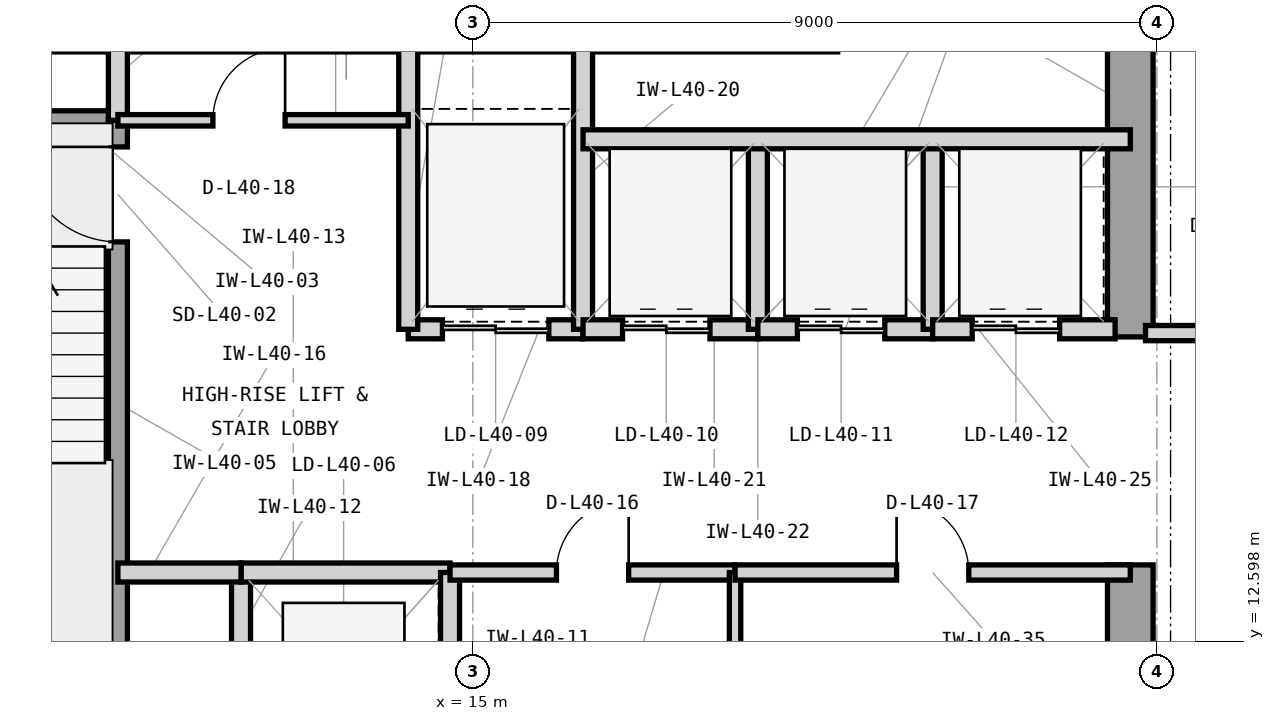
"""IFC4 building model, lengths in metres.
Left out: names, types, materials, properties, quantities, classifications, styles, units other than length and angle.
Written with IfcOpenShell. Run it as: python <this file> out.ifc"""

import sys

from ifc_helpers import new_model, si_unit, direction, frame, frame_2d, origin, place, context, subcontext, project, spatial, rectangle, extrude, element, fill, save


model = new_model("IFC4")
c1 = context("Model", 3, precision=1e-05, world=origin(), true_north=direction((0.0, 1.0)))
c2 = subcontext(c1, "Body", "Model", "MODEL_VIEW")
j1 = project(units=[si_unit("LENGTHUNIT", "METRE"), si_unit("PLANEANGLEUNIT", "RADIAN")], contexts=[c1])
p1 = place(None, origin())
s1 = spatial("IfcSite", under=j1, at=p1, CompositionType="ELEMENT")
p2 = place(p1, origin())
s2 = spatial("IfcBuilding", under=s1, at=p2, CompositionType="ELEMENT")
p3 = place(p2, frame((0.0, 0.0, 168.3)))
s3 = spatial("IfcBuildingStorey", under=s2, at=p3, CompositionType="ELEMENT", Elevation=168.3)
p4 = place(p3, frame((7.475, 20.65, 0.0), z_axis=(0.0, 0.0, 1.0), x_axis=(1.0, 0.0, 0.0)))
e1 = element("IfcWall", 1, at=p4, inside=s3, PredefinedType="SHEAR", context=c2, shape_type="SweptSolid", body=[
    extrude(rectangle(XDim=12.325, YDim=0.6, at=frame_2d((6.163, 0.0))), origin(), (0.0, 0.0, 1.0), 3.9),
])
p5 = place(p3, frame((23.65, 10.4, 0.0), z_axis=(0.0, 0.0, 1.0), x_axis=(0.0, 1.0, 0.0)))
e2 = element("IfcWall", 2, at=p5, inside=s3, PredefinedType="SHEAR", context=c2, shape_type="SweptSolid", body=[
    extrude(rectangle(XDim=3.2, YDim=0.6, at=frame_2d((1.6, 0.0))), origin(), (0.0, 0.0, 1.0), 3.9),
])
p6 = place(p3, frame((23.65, 16.6, 0.0), z_axis=(0.0, 0.0, 1.0), x_axis=(0.0, 1.0, 0.0)))
e3 = element("IfcWall", 3, at=p6, inside=s3, PredefinedType="SHEAR", context=c2, shape_type="SweptSolid", body=[
    extrude(rectangle(XDim=4.05, YDim=0.6, at=frame_2d((2.025, 0.0))), origin(), (0.0, 0.0, 1.0), 3.9),
])
p7 = place(p3, frame((7.7, 19.45, 0.0), z_axis=(0.0, 0.0, 1.0), x_axis=(1.0, 0.0, 0.0)))
e4 = element("IfcWall", 4, at=p7, inside=s3, PredefinedType="SHEAR", context=c2, shape_type="SweptSolid", body=[
    extrude(rectangle(XDim=2.755, YDim=0.25, at=frame_2d((1.377, 0.0))), origin(), (0.0, 0.0, 1.0), 3.9),
])
p8 = place(p3, frame((10.33, 12.0, 0.0), z_axis=(0.0, 0.0, 1.0), x_axis=(0.0, 1.0, 0.0)))
e5 = element("IfcWall", 5, at=p8, inside=s3, PredefinedType="SHEAR", context=c2, shape_type="SweptSolid", body=[
    extrude(rectangle(XDim=7.45, YDim=0.25, at=frame_2d((3.725, 0.0))), origin(), (0.0, 0.0, 1.0), 3.9),
])
p9 = place(p8, frame((5.85, 0.0, 0.0)))
e6 = element("IfcOpeningElement", 6, at=p9, cuts=e5, PredefinedType="OPENING", context=c2, shape_type="SweptSolid", body=[
    extrude(rectangle(XDim=1.25, YDim=2.2, at=frame_2d((0.625, 1.1))), frame((0.0, 0.135, 0.0), z_axis=(0.0, -1.0, 0.0), x_axis=(1.0, 0.0, 0.0)), (0.0, 0.0, 1.0), 0.27),
])
p10 = place(p3, frame((10.33, 19.45, 0.0), z_axis=(0.0, 0.0, 1.0), x_axis=(0.0, 1.0, 0.0)))
e7 = element("IfcWall", 7, at=p10, inside=s3, PredefinedType="PARTITIONING", context=c2, shape_type="SweptSolid", body=[
    extrude(rectangle(XDim=1.2, YDim=0.25, at=frame_2d((0.6, 0.0))), origin(), (0.0, 0.0, 1.0), 3.073),
])
p11 = place(p3, frame((11.95, 10.5, 0.0), z_axis=(0.0, 0.0, 1.0), x_axis=(0.0, 1.0, 0.0)))
e8 = element("IfcWall", 8, at=p11, inside=s3, PredefinedType="PARTITIONING", context=c2, shape_type="SweptSolid", body=[
    extrude(rectangle(XDim=3.0, YDim=0.25, at=frame_2d((1.5, 0.0))), origin(), (0.0, 0.0, 1.0), 3.69),
])
p12 = place(p3, frame((11.95, 13.5, 0.0), z_axis=(0.0, 0.0, 1.0), x_axis=(1.0, 0.0, 0.0)))
e9 = element("IfcWall", 9, at=p12, inside=s3, PredefinedType="PARTITIONING", context=c2, shape_type="SweptSolid", body=[
    extrude(rectangle(XDim=2.75, YDim=0.25, at=frame_2d((1.375, 0.0))), origin(), (0.0, 0.0, 1.0), 3.283),
])
p13 = place(p3, frame((14.7, 10.5, 0.0), z_axis=(0.0, 0.0, 1.0), x_axis=(0.0, 1.0, 0.0)))
e10 = element("IfcWall", 10, at=p13, inside=s3, PredefinedType="PARTITIONING", context=c2, shape_type="SweptSolid", body=[
    extrude(rectangle(XDim=3.0, YDim=0.25, at=frame_2d((1.5, 0.0))), origin(), (0.0, 0.0, 1.0), 3.69),
])
p14 = place(p3, frame((10.33, 13.5, 0.0), z_axis=(0.0, 0.0, 1.0), x_axis=(1.0, 0.0, 0.0)))
e11 = element("IfcWall", 11, at=p14, inside=s3, PredefinedType="PARTITIONING", context=c2, shape_type="SweptSolid", body=[
    extrude(rectangle(XDim=1.62, YDim=0.25, at=frame_2d((0.81, 0.0))), origin(), (0.0, 0.0, 1.0), 3.283),
])
p15 = place(p3, frame((14.15, 16.7, 0.0), z_axis=(0.0, 0.0, 1.0), x_axis=(1.0, 0.0, 0.0)))
e12 = element("IfcWall", 12, at=p15, inside=s3, PredefinedType="PARTITIONING", context=c2, shape_type="SweptSolid", body=[
    extrude(rectangle(XDim=2.3, YDim=0.25, at=frame_2d((1.15, 0.0))), origin(), (0.0, 0.0, 1.0), 3.283),
])
p16 = place(p15, frame((0.45, 0.0, 0.0)))
e13 = element("IfcOpeningElement", 13, at=p16, cuts=e12, PredefinedType="OPENING", context=c2, shape_type="SweptSolid", body=[
    extrude(rectangle(XDim=1.4, YDim=2.35, at=frame_2d((0.7, 1.175))), frame((0.0, 0.135, 0.0), z_axis=(0.0, -1.0, 0.0), x_axis=(1.0, 0.0, 0.0)), (0.0, 0.0, 1.0), 0.27),
])
for number, where, z_axis, x_axis in (
    (14, (14.15, 16.7, 0.0), (0.0, 0.0, 1.0), (0.0, 1.0, 0.0)),
    (15, (16.45, 16.7, 0.0), (0.0, 0.0, 1.0), (0.0, 1.0, 0.0)),
):
    element("IfcWall", number, at=place(p3, frame(where, z_axis=z_axis, x_axis=x_axis)), inside=s3, PredefinedType="PARTITIONING", context=c2, shape_type="SweptSolid", body=[
        extrude(rectangle(XDim=3.95, YDim=0.25, at=frame_2d((1.975, 0.0))), origin(), (0.0, 0.0, 1.0), 3.69),
    ])
p17 = place(p3, frame((16.45, 16.7, 0.0), z_axis=(0.0, 0.0, 1.0), x_axis=(1.0, 0.0, 0.0)))
e16 = element("IfcWall", 16, at=p17, inside=s3, PredefinedType="PARTITIONING", context=c2, shape_type="SweptSolid", body=[
    extrude(rectangle(XDim=2.3, YDim=0.25, at=frame_2d((1.15, 0.0))), origin(), (0.0, 0.0, 1.0), 3.283),
])
p18 = place(p17, frame((0.52, 0.0, 0.0)))
e17 = element("IfcOpeningElement", 17, at=p18, cuts=e16, PredefinedType="OPENING", context=c2, shape_type="SweptSolid", body=[
    extrude(rectangle(XDim=1.15, YDim=2.25, at=frame_2d((0.575, 1.125))), frame((0.0, 0.135, 0.0), z_axis=(0.0, -1.0, 0.0), x_axis=(1.0, 0.0, 0.0)), (0.0, 0.0, 1.0), 0.27),
])
p19 = place(p3, frame((18.75, 16.7, 0.0), z_axis=(0.0, 0.0, 1.0), x_axis=(0.0, 1.0, 0.0)))
e18 = element("IfcWall", 18, at=p19, inside=s3, PredefinedType="PARTITIONING", context=c2, shape_type="SweptSolid", body=[
    extrude(rectangle(XDim=2.5, YDim=0.25, at=frame_2d((1.25, 0.0))), origin(), (0.0, 0.0, 1.0), 3.69),
])
p20 = place(p3, frame((18.75, 16.7, 0.0), z_axis=(0.0, 0.0, 1.0), x_axis=(1.0, 0.0, 0.0)))
e19 = element("IfcWall", 19, at=p20, inside=s3, PredefinedType="PARTITIONING", context=c2, shape_type="SweptSolid", body=[
    extrude(rectangle(XDim=2.3, YDim=0.25, at=frame_2d((1.15, 0.0))), origin(), (0.0, 0.0, 1.0), 3.283),
])
p21 = place(p20, frame((0.52, 0.0, 0.0)))
e20 = element("IfcOpeningElement", 20, at=p21, cuts=e19, PredefinedType="OPENING", context=c2, shape_type="SweptSolid", body=[
    extrude(rectangle(XDim=1.15, YDim=2.25, at=frame_2d((0.575, 1.125))), frame((0.0, 0.135, 0.0), z_axis=(0.0, -1.0, 0.0), x_axis=(1.0, 0.0, 0.0)), (0.0, 0.0, 1.0), 0.27),
])
p22 = place(p3, frame((21.05, 16.7, 0.0), z_axis=(0.0, 0.0, 1.0), x_axis=(0.0, 1.0, 0.0)))
e21 = element("IfcWall", 21, at=p22, inside=s3, PredefinedType="PARTITIONING", context=c2, shape_type="SweptSolid", body=[
    extrude(rectangle(XDim=2.5, YDim=0.25, at=frame_2d((1.25, 0.0))), origin(), (0.0, 0.0, 1.0), 3.69),
])
p23 = place(p3, frame((21.05, 16.7, 0.0), z_axis=(0.0, 0.0, 1.0), x_axis=(1.0, 0.0, 0.0)))
e22 = element("IfcWall", 22, at=p23, inside=s3, PredefinedType="PARTITIONING", context=c2, shape_type="SweptSolid", body=[
    extrude(rectangle(XDim=2.4, YDim=0.25, at=frame_2d((1.2, 0.0))), origin(), (0.0, 0.0, 1.0), 3.283),
])
p24 = place(p23, frame((0.52, 0.0, 0.0)))
e23 = element("IfcOpeningElement", 23, at=p24, cuts=e22, PredefinedType="OPENING", context=c2, shape_type="SweptSolid", body=[
    extrude(rectangle(XDim=1.15, YDim=2.25, at=frame_2d((0.575, 1.125))), frame((0.0, 0.135, 0.0), z_axis=(0.0, -1.0, 0.0), x_axis=(1.0, 0.0, 0.0)), (0.0, 0.0, 1.0), 0.27),
])
p25 = place(p3, frame((16.45, 19.2, 0.0), z_axis=(0.0, 0.0, 1.0), x_axis=(1.0, 0.0, 0.0)))
e24 = element("IfcWall", 24, at=p25, inside=s3, PredefinedType="PARTITIONING", context=c2, shape_type="SweptSolid", body=[
    extrude(rectangle(XDim=7.2, YDim=0.25, at=frame_2d((3.6, 0.0))), origin(), (0.0, 0.0, 1.0), 3.69),
])
p26 = place(p3, frame((14.7, 13.5, 0.0), z_axis=(0.0, 0.0, 1.0), x_axis=(1.0, 0.0, 0.0)))
e25 = element("IfcWall", 25, at=p26, inside=s3, PredefinedType="PARTITIONING", context=c2, shape_type="SweptSolid", body=[
    extrude(rectangle(XDim=3.75, YDim=0.2, at=frame_2d((1.875, 0.0))), origin(), (0.0, 0.0, 1.0), 3.283),
])
p27 = place(p26, frame((1.4, 0.0, 0.0)))
e26 = element("IfcOpeningElement", 26, at=p27, cuts=e25, PredefinedType="OPENING", context=c2, shape_type="SweptSolid", body=[
    extrude(rectangle(XDim=0.95, YDim=2.1, at=frame_2d((0.475, 1.05))), frame((0.0, 0.11, 0.0), z_axis=(0.0, -1.0, 0.0), x_axis=(1.0, 0.0, 0.0)), (0.0, 0.0, 1.0), 0.22),
])
p28 = place(p3, frame((18.45, 10.28, 0.0), z_axis=(0.0, 0.0, 1.0), x_axis=(0.0, 1.0, 0.0)))
e27 = element("IfcWall", 27, at=p28, inside=s3, PredefinedType="PARTITIONING", context=c2, shape_type="SweptSolid", body=[
    extrude(rectangle(XDim=3.22, YDim=0.15, at=frame_2d((1.61, 0.0))), origin(), (0.0, 0.0, 1.0), 3.69),
])
p29 = place(p3, frame((18.45, 13.5, 0.0), z_axis=(0.0, 0.0, 1.0), x_axis=(1.0, 0.0, 0.0)))
e28 = element("IfcWall", 28, at=p29, inside=s3, PredefinedType="PARTITIONING", context=c2, shape_type="SweptSolid", body=[
    extrude(rectangle(XDim=5.2, YDim=0.2, at=frame_2d((2.6, 0.0))), origin(), (0.0, 0.0, 1.0), 3.283),
])
p30 = place(p29, frame((2.125, 0.0, 0.0)))
e29 = element("IfcOpeningElement", 29, at=p30, cuts=e28, PredefinedType="OPENING", context=c2, shape_type="SweptSolid", body=[
    extrude(rectangle(XDim=0.95, YDim=2.1, at=frame_2d((0.475, 1.05))), frame((0.0, 0.11, 0.0), z_axis=(0.0, -1.0, 0.0), x_axis=(1.0, 0.0, 0.0)), (0.0, 0.0, 1.0), 0.22),
])
p31 = place(p3, frame((10.33, 19.45, 0.0), z_axis=(0.0, 0.0, 1.0), x_axis=(1.0, 0.0, 0.0)))
e30 = element("IfcWall", 30, at=p31, inside=s3, PredefinedType="PARTITIONING", context=c2, shape_type="SweptSolid", body=[
    extrude(rectangle(XDim=3.82, YDim=0.15, at=frame_2d((1.91, 0.0))), origin(), (0.0, 0.0, 1.0), 3.69),
])
p32 = place(p31, frame((1.25, 0.0, 0.0)))
e31 = element("IfcOpeningElement", 31, at=p32, cuts=e30, PredefinedType="OPENING", context=c2, shape_type="SweptSolid", body=[
    extrude(rectangle(XDim=0.95, YDim=2.1, at=frame_2d((0.475, 1.05))), frame((0.0, 0.085, 0.0), z_axis=(0.0, -1.0, 0.0), x_axis=(1.0, 0.0, 0.0)), (0.0, 0.0, 1.0), 0.17),
])
p33 = place(p3, frame((23.85, 16.65, 0.0), z_axis=(0.0, 0.0, 1.0), x_axis=(1.0, 0.0, 0.0)))
e32 = element("IfcWall", 32, at=p33, inside=s3, PredefinedType="PARTITIONING", context=c2, shape_type="SweptSolid", body=[
    extrude(rectangle(XDim=2.85, YDim=0.2, at=frame_2d((1.425, 0.0))), origin(), (0.0, 0.0, 1.0), 3.69),
])
p34 = place(p33, frame((0.7, 0.0, 0.0)))
e33 = element("IfcOpeningElement", 33, at=p34, cuts=e32, PredefinedType="OPENING", context=c2, shape_type="SweptSolid", body=[
    extrude(rectangle(XDim=1.0, YDim=2.15, at=frame_2d((0.5, 1.075))), frame((0.0, 0.11, 0.0), z_axis=(0.0, -1.0, 0.0), x_axis=(1.0, 0.0, 0.0)), (0.0, 0.0, 1.0), 0.22),
])
p35 = place(p9, origin())
e34 = element("IfcDoor", 34, at=p35, inside=s3, OperationType="SINGLE_SWING_RIGHT", PredefinedType="DOOR", context=c2, shape_type="SweptSolid", body=[
    extrude(rectangle(XDim=1.25, YDim=2.2, at=frame_2d((0.625, 1.1))), frame((0.0, 0.025, 0.0), z_axis=(0.0, -1.0, 0.0), x_axis=(1.0, 0.0, 0.0)), (0.0, 0.0, 1.0), 0.05),
])
fill(e6, e34)
p36 = place(p16, origin())
e35 = element("IfcDoor", 35, at=p36, inside=s3, OperationType="DOUBLE_DOOR_SLIDING", PredefinedType="DOOR", context=c2, shape_type="SweptSolid", body=[
    extrude(rectangle(XDim=1.4, YDim=2.35, at=frame_2d((0.7, 1.175))), frame((0.0, 0.025, 0.0), z_axis=(0.0, -1.0, 0.0), x_axis=(1.0, 0.0, 0.0)), (0.0, 0.0, 1.0), 0.05),
])
fill(e13, e35)
p37 = place(p18, origin())
e36 = element("IfcDoor", 36, at=p37, inside=s3, OperationType="DOUBLE_DOOR_SLIDING", PredefinedType="DOOR", context=c2, shape_type="SweptSolid", body=[
    extrude(rectangle(XDim=1.15, YDim=2.25, at=frame_2d((0.575, 1.125))), frame((0.0, 0.025, 0.0), z_axis=(0.0, -1.0, 0.0), x_axis=(1.0, 0.0, 0.0)), (0.0, 0.0, 1.0), 0.05),
])
fill(e17, e36)
p38 = place(p21, origin())
e37 = element("IfcDoor", 37, at=p38, inside=s3, OperationType="DOUBLE_DOOR_SLIDING", PredefinedType="DOOR", context=c2, shape_type="SweptSolid", body=[
    extrude(rectangle(XDim=1.15, YDim=2.25, at=frame_2d((0.575, 1.125))), frame((0.0, 0.025, 0.0), z_axis=(0.0, -1.0, 0.0), x_axis=(1.0, 0.0, 0.0)), (0.0, 0.0, 1.0), 0.05),
])
fill(e20, e37)
p39 = place(p24, origin())
e38 = element("IfcDoor", 38, at=p39, inside=s3, OperationType="DOUBLE_DOOR_SLIDING", PredefinedType="DOOR", context=c2, shape_type="SweptSolid", body=[
    extrude(rectangle(XDim=1.15, YDim=2.25, at=frame_2d((0.575, 1.125))), frame((0.0, 0.025, 0.0), z_axis=(0.0, -1.0, 0.0), x_axis=(1.0, 0.0, 0.0)), (0.0, 0.0, 1.0), 0.05),
])
fill(e23, e38)
p40 = place(p27, origin())
e39 = element("IfcDoor", 39, at=p40, inside=s3, OperationType="SINGLE_SWING_RIGHT", PredefinedType="DOOR", context=c2, shape_type="SweptSolid", body=[
    extrude(rectangle(XDim=0.95, YDim=2.1, at=frame_2d((0.475, 1.05))), frame((0.0, 0.025, 0.0), z_axis=(0.0, -1.0, 0.0), x_axis=(1.0, 0.0, 0.0)), (0.0, 0.0, 1.0), 0.05),
])
fill(e26, e39)
p41 = place(p30, origin())
e40 = element("IfcDoor", 40, at=p41, inside=s3, OperationType="SINGLE_SWING_LEFT", PredefinedType="DOOR", context=c2, shape_type="SweptSolid", body=[
    extrude(rectangle(XDim=0.95, YDim=2.1, at=frame_2d((0.475, 1.05))), frame((0.0, 0.025, 0.0), z_axis=(0.0, -1.0, 0.0), x_axis=(1.0, 0.0, 0.0)), (0.0, 0.0, 1.0), 0.05),
])
fill(e29, e40)
p42 = place(p32, origin())
e41 = element("IfcDoor", 41, at=p42, inside=s3, OperationType="SINGLE_SWING_RIGHT", PredefinedType="DOOR", context=c2, shape_type="SweptSolid", body=[
    extrude(rectangle(XDim=0.95, YDim=2.1, at=frame_2d((0.475, 1.05))), frame((0.0, 0.025, 0.0), z_axis=(0.0, -1.0, 0.0), x_axis=(1.0, 0.0, 0.0)), (0.0, 0.0, 1.0), 0.05),
])
fill(e31, e41)
save(model, sys.argv[1])
